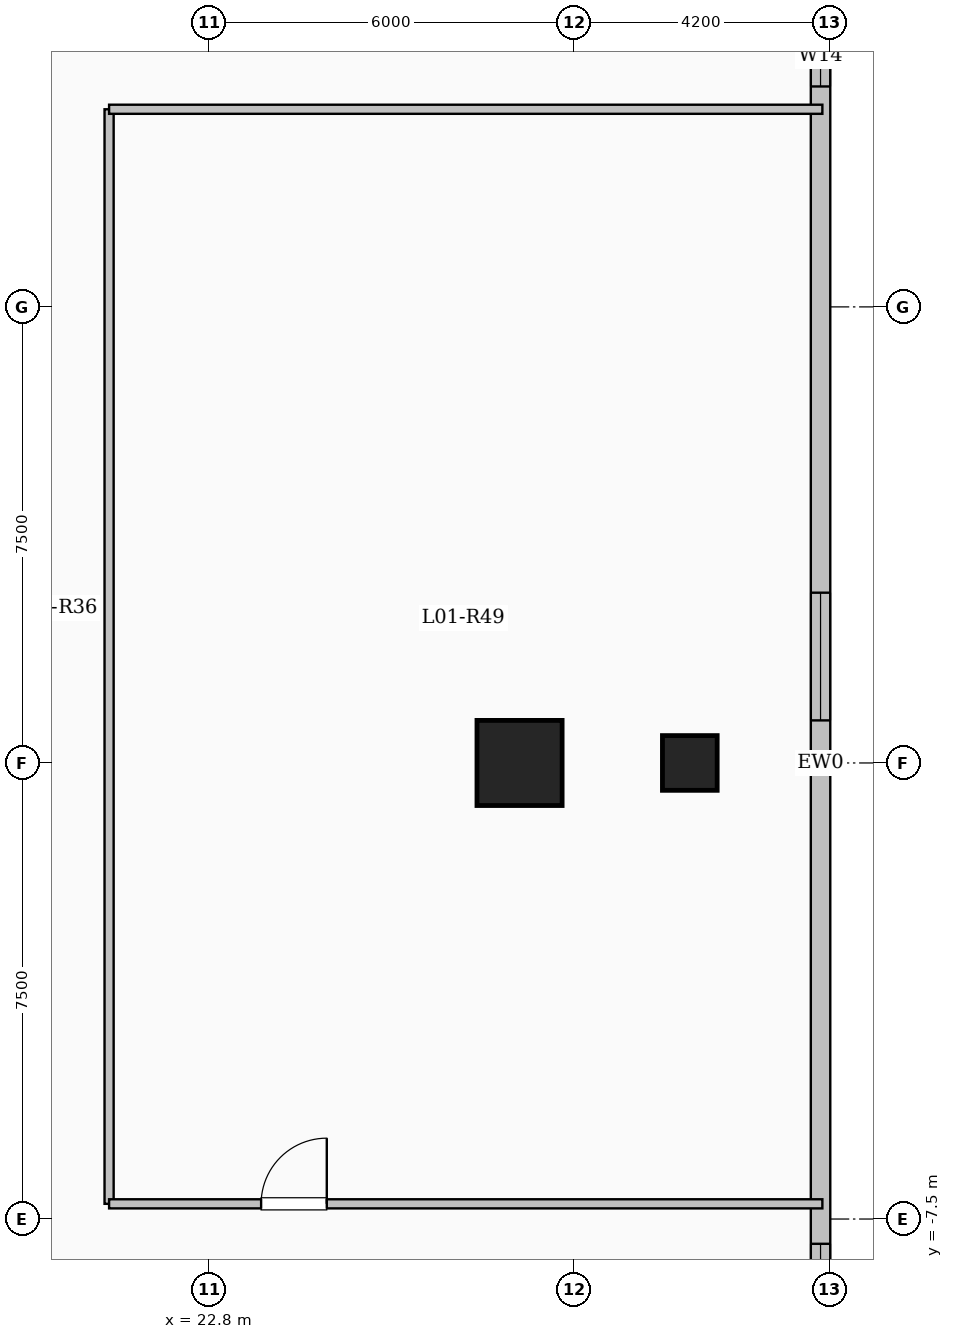
"""IFC4 building model, lengths in metres.
Left out: names, types, materials, properties, quantities, classifications, styles, units other than length and angle.
Written with IfcOpenShell. Run it as: python <this file> out.ifc"""

import sys

from ifc_helpers import new_model, si_unit, direction, frame, frame_2d, origin, origin_2d, place, context, subcontext, project, spatial, rectangle, extrude, element, fill, save


model = new_model("IFC4")
c1 = context("Model", 3, precision=1e-05, world=origin(), true_north=direction((0.0, 1.0)))
c2 = subcontext(c1, "Body", "Model", "MODEL_VIEW")
j1 = project(units=[si_unit("LENGTHUNIT", "METRE"), si_unit("PLANEANGLEUNIT", "RADIAN")], contexts=[c1])
p1 = place(None, origin())
s1 = spatial("IfcSite", under=j1, at=p1, CompositionType="ELEMENT")
p2 = place(p1, origin())
s2 = spatial("IfcBuilding", under=s1, at=p2, CompositionType="ELEMENT")
p3 = place(p2, frame((0.0, 0.0, 5.4)))
s3 = spatial("IfcBuildingStorey", under=s2, at=p3, CompositionType="ELEMENT", Elevation=5.4)
p4 = place(p3, frame((30.7, 0.0, 0.0), z_axis=(0.0, 0.0, 1.0), x_axis=(1.0, 0.0, 0.0)))
e1 = element("IfcColumn", 1, at=p4, inside=s3, PredefinedType="COLUMN", context=c2, shape_type="SweptSolid", body=[
    extrude(rectangle(XDim=0.9, YDim=0.9, at=origin_2d()), origin(), (0.0, 0.0, 1.0), 4.28),
])
p5 = place(p3, frame((27.9, 0.0, 0.0), z_axis=(0.0, 0.0, 1.0), x_axis=(1.0, 0.0, 0.0)))
e2 = element("IfcColumn", 2, at=p5, inside=s3, PredefinedType="COLUMN", context=c2, shape_type="SweptSolid", body=[
    extrude(rectangle(XDim=1.4, YDim=1.4, at=origin_2d()), origin(), (0.0, 0.0, 1.0), 4.5),
])
p6 = place(p3, frame((32.85, 29.85, 0.0), z_axis=(0.0, 0.0, 1.0), x_axis=(0.0, -1.0, 0.0)))
e3 = element("IfcWall", 3, at=p6, inside=s3, PredefinedType="SOLIDWALL", context=c2, shape_type="SweptSolid", body=[
    extrude(rectangle(XDim=59.7, YDim=0.32, at=frame_2d((29.85, 0.0))), origin(), (0.0, 0.0, 1.0), 4.2),
])
p7 = place(p6, frame((7.6, 0.0, 0.9)))
e4 = element("IfcOpeningElement", 4, at=p7, cuts=e3, PredefinedType="OPENING", context=c2, shape_type="SweptSolid", body=[
    extrude(rectangle(XDim=2.1, YDim=2.0, at=frame_2d((1.05, 1.0))), frame((0.0, 0.17, 0.0), z_axis=(0.0, -1.0, 0.0), x_axis=(1.0, 0.0, 0.0)), (0.0, 0.0, 1.0), 0.34),
])
p8 = place(p6, frame((17.725, 0.0, 0.95)))
e5 = element("IfcOpeningElement", 5, at=p8, cuts=e3, PredefinedType="OPENING", context=c2, shape_type="SweptSolid", body=[
    extrude(rectangle(XDim=1.0, YDim=1.5, at=frame_2d((0.5, 0.75))), frame((0.0, 0.17, 0.0), z_axis=(0.0, -1.0, 0.0), x_axis=(1.0, 0.0, 0.0)), (0.0, 0.0, 1.0), 0.34),
])
p9 = place(p6, frame((27.05, 0.0, 0.9)))
e6 = element("IfcOpeningElement", 6, at=p9, cuts=e3, PredefinedType="OPENING", context=c2, shape_type="SweptSolid", body=[
    extrude(rectangle(XDim=2.1, YDim=2.0, at=frame_2d((1.05, 1.0))), frame((0.0, 0.17, 0.0), z_axis=(0.0, -1.0, 0.0), x_axis=(1.0, 0.0, 0.0)), (0.0, 0.0, 1.0), 0.34),
])
p10 = place(p6, frame((37.758, 0.0, 0.9)))
e7 = element("IfcOpeningElement", 7, at=p10, cuts=e3, PredefinedType="OPENING", context=c2, shape_type="SweptSolid", body=[
    extrude(rectangle(XDim=1.7, YDim=1.9, at=frame_2d((0.85, 0.95))), frame((0.0, 0.17, 0.0), z_axis=(0.0, -1.0, 0.0), x_axis=(1.0, 0.0, 0.0)), (0.0, 0.0, 1.0), 0.34),
])
p11 = place(p3, frame((21.15, -7.25, 0.0), z_axis=(0.0, 0.0, 1.0), x_axis=(0.0, 1.0, 0.0)))
e8 = element("IfcWall", 8, at=p11, inside=s3, PredefinedType="PARTITIONING", context=c2, shape_type="SweptSolid", body=[
    extrude(rectangle(XDim=18.0, YDim=0.15, at=frame_2d((9.0, 0.0))), origin(), (0.0, 0.0, 1.0), 4.2),
])
p12 = place(p3, frame((21.15, -7.25, 0.0), z_axis=(0.0, 0.0, 1.0), x_axis=(1.0, 0.0, 0.0)))
e9 = element("IfcWall", 9, at=p12, inside=s3, PredefinedType="PARTITIONING", context=c2, shape_type="SweptSolid", body=[
    extrude(rectangle(XDim=11.73, YDim=0.15, at=frame_2d((5.865, 0.0))), origin(), (0.0, 0.0, 1.0), 4.2),
])
p13 = place(p12, frame((2.5, 0.0, 0.0)))
e10 = element("IfcOpeningElement", 10, at=p13, cuts=e9, PredefinedType="OPENING", context=c2, shape_type="SweptSolid", body=[
    extrude(rectangle(XDim=1.08, YDim=2.15, at=frame_2d((0.54, 1.075))), frame((0.0, 0.085, 0.0), z_axis=(0.0, -1.0, 0.0), x_axis=(1.0, 0.0, 0.0)), (0.0, 0.0, 1.0), 0.17),
])
p14 = place(p3, frame((21.15, 10.75, 0.0), z_axis=(0.0, 0.0, 1.0), x_axis=(1.0, 0.0, 0.0)))
e11 = element("IfcWall", 11, at=p14, inside=s3, PredefinedType="PARTITIONING", context=c2, shape_type="SweptSolid", body=[
    extrude(rectangle(XDim=11.73, YDim=0.15, at=frame_2d((5.865, 0.0))), origin(), (0.0, 0.0, 1.0), 4.2),
])
p15 = place(p8, origin())
e12 = element("IfcWindow", 12, at=p15, inside=s3, PartitioningType="SINGLE_PANEL", PredefinedType="WINDOW", context=c2, shape_type="SweptSolid", body=[
    extrude(rectangle(XDim=1.0, YDim=1.5, at=frame_2d((0.5, 0.75))), frame((0.0, 0.03, 0.0), z_axis=(0.0, -1.0, 0.0), x_axis=(1.0, 0.0, 0.0)), (0.0, 0.0, 1.0), 0.06),
])
fill(e5, e12)
p16 = place(p9, origin())
e13 = element("IfcWindow", 13, at=p16, inside=s3, PartitioningType="SINGLE_PANEL", PredefinedType="WINDOW", context=c2, shape_type="SweptSolid", body=[
    extrude(rectangle(XDim=2.1, YDim=2.0, at=frame_2d((1.05, 1.0))), frame((0.0, 0.03, 0.0), z_axis=(0.0, -1.0, 0.0), x_axis=(1.0, 0.0, 0.0)), (0.0, 0.0, 1.0), 0.06),
])
fill(e6, e13)
p17 = place(p10, origin())
e14 = element("IfcWindow", 14, at=p17, inside=s3, PartitioningType="SINGLE_PANEL", PredefinedType="WINDOW", context=c2, shape_type="SweptSolid", body=[
    extrude(rectangle(XDim=1.7, YDim=1.9, at=frame_2d((0.85, 0.95))), frame((0.0, 0.03, 0.0), z_axis=(0.0, -1.0, 0.0), x_axis=(1.0, 0.0, 0.0)), (0.0, 0.0, 1.0), 0.06),
])
fill(e7, e14)
p18 = place(p13, origin())
e15 = element("IfcDoor", 15, at=p18, inside=s3, OperationType="SINGLE_SWING_RIGHT", PredefinedType="DOOR", context=c2, shape_type="SweptSolid", body=[
    extrude(rectangle(XDim=1.08, YDim=2.15, at=frame_2d((0.54, 1.075))), frame((0.0, 0.025, 0.0), z_axis=(0.0, -1.0, 0.0), x_axis=(1.0, 0.0, 0.0)), (0.0, 0.0, 1.0), 0.05),
])
fill(e10, e15)
save(model, sys.argv[1])
